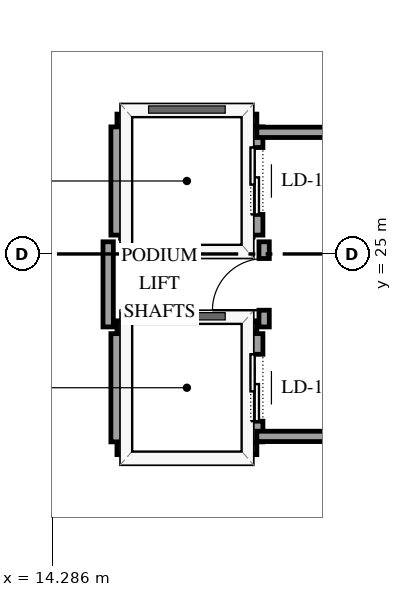
"""IFC4 building model, lengths in metres.
Left out: names, types, materials, properties, quantities, classifications, styles, units other than length and angle.
Written with IfcOpenShell. Run it as: python <this file> out.ifc"""

import sys

from ifc_helpers import new_model, si_unit, direction, frame, frame_2d, origin, place, context, subcontext, project, spatial, rectangle, extrude, element, fill, save


model = new_model("IFC4")
c1 = context("Model", 3, precision=1e-05, world=origin(), true_north=direction((0.0, 1.0)))
c2 = subcontext(c1, "Body", "Model", "MODEL_VIEW")
j1 = project(units=[si_unit("LENGTHUNIT", "METRE"), si_unit("PLANEANGLEUNIT", "RADIAN")], contexts=[c1])
p1 = place(None, origin())
s1 = spatial("IfcSite", under=j1, at=p1, CompositionType="ELEMENT")
p2 = place(p1, origin())
s2 = spatial("IfcBuilding", under=s1, at=p2, CompositionType="ELEMENT")
p3 = place(p2, origin())
s3 = spatial("IfcBuildingStorey", under=s2, at=p3, CompositionType="ELEMENT", Elevation=0.0)
for number, where, z_axis, x_axis in (
    (1, (15.35, 21.8, 0.0), (0.0, 0.0, 1.0), (1.0, 0.0, 0.0)),
    (2, (15.35, 23.8, 0.0), (0.0, 0.0, 1.0), (1.0, 0.0, 0.0)),
):
    element("IfcWall", number, at=place(p3, frame(where, z_axis=z_axis, x_axis=x_axis)), inside=s3, PredefinedType="SOLIDWALL", context=c2, shape_type="SweptSolid", body=[
        extrude(rectangle(XDim=2.3, YDim=0.2, at=frame_2d((1.15, 0.0))), origin(), (0.0, 0.0, 1.0), 5.68),
    ])
p4 = place(p3, frame((15.35, 21.91, 0.0), z_axis=(0.0, 0.0, 1.0), x_axis=(0.0, 1.0, 0.0)))
e3 = element("IfcWall", 3, at=p4, inside=s3, PredefinedType="SOLIDWALL", context=c2, shape_type="SweptSolid", body=[
    extrude(rectangle(XDim=1.78, YDim=0.2, at=frame_2d((0.89, 0.0))), origin(), (0.0, 0.0, 1.0), 5.68),
])
p5 = place(p3, frame((17.65, 21.91, 0.0), z_axis=(0.0, 0.0, 1.0), x_axis=(0.0, 1.0, 0.0)))
e4 = element("IfcWall", 4, at=p5, inside=s3, PredefinedType="SOLIDWALL", context=c2, shape_type="SweptSolid", body=[
    extrude(rectangle(XDim=1.78, YDim=0.2, at=frame_2d((0.89, 0.0))), origin(), (0.0, 0.0, 1.0), 5.68),
])
p6 = place(p5, frame((0.34, 0.0, 0.0)))
e5 = element("IfcOpeningElement", 5, at=p6, cuts=e4, PredefinedType="OPENING", context=c2, shape_type="SweptSolid", body=[
    extrude(rectangle(XDim=1.1, YDim=2.15, at=frame_2d((0.55, 1.075))), frame((0.0, 0.11, 0.0), z_axis=(0.0, -1.0, 0.0), x_axis=(1.0, 0.0, 0.0)), (0.0, 0.0, 1.0), 0.22),
])
p7 = place(p3, frame((15.35, 27.2, 0.0), z_axis=(0.0, 0.0, 1.0), x_axis=(1.0, 0.0, 0.0)))
e6 = element("IfcWall", 6, at=p7, inside=s3, PredefinedType="SOLIDWALL", context=c2, shape_type="SweptSolid", body=[
    extrude(rectangle(XDim=2.3, YDim=0.2, at=frame_2d((1.15, 0.0))), origin(), (0.0, 0.0, 1.0), 5.68),
])
p8 = place(p3, frame((15.35, 25.31, 0.0), z_axis=(0.0, 0.0, 1.0), x_axis=(0.0, 1.0, 0.0)))
e7 = element("IfcWall", 7, at=p8, inside=s3, PredefinedType="SOLIDWALL", context=c2, shape_type="SweptSolid", body=[
    extrude(rectangle(XDim=1.78, YDim=0.2, at=frame_2d((0.89, 0.0))), origin(), (0.0, 0.0, 1.0), 5.68),
])
p9 = place(p3, frame((17.65, 25.31, 0.0), z_axis=(0.0, 0.0, 1.0), x_axis=(0.0, 1.0, 0.0)))
e8 = element("IfcWall", 8, at=p9, inside=s3, PredefinedType="SOLIDWALL", context=c2, shape_type="SweptSolid", body=[
    extrude(rectangle(XDim=1.78, YDim=0.2, at=frame_2d((0.89, 0.0))), origin(), (0.0, 0.0, 1.0), 5.68),
])
p10 = place(p9, frame((0.34, 0.0, 0.0)))
e9 = element("IfcOpeningElement", 9, at=p10, cuts=e8, PredefinedType="OPENING", context=c2, shape_type="SweptSolid", body=[
    extrude(rectangle(XDim=1.1, YDim=2.15, at=frame_2d((0.55, 1.075))), frame((0.0, 0.11, 0.0), z_axis=(0.0, -1.0, 0.0), x_axis=(1.0, 0.0, 0.0)), (0.0, 0.0, 1.0), 0.22),
])
for number, where, z_axis, x_axis in (
    (10, (30.53, 22.0, 0.0), (0.0, 0.0, 1.0), (-1.0, 0.0, 0.0)),
    (11, (17.65, 27.0, 0.0), (0.0, 0.0, 1.0), (1.0, 0.0, 0.0)),
):
    element("IfcWall", number, at=place(p3, frame(where, z_axis=z_axis, x_axis=x_axis)), inside=s3, PredefinedType="PARTITIONING", context=c2, shape_type="SweptSolid", body=[
        extrude(rectangle(XDim=12.88, YDim=0.17, at=frame_2d((6.44, 0.0))), origin(), (0.0, 0.0, 1.0), 5.68),
    ])
p11 = place(p3, frame((17.77, 23.8, 0.0), z_axis=(0.0, 0.0, 1.0), x_axis=(0.0, 1.0, 0.0)))
e12 = element("IfcWall", 12, at=p11, inside=s3, PredefinedType="PARTITIONING", context=c2, shape_type="SweptSolid", body=[
    extrude(rectangle(XDim=1.4, YDim=0.17, at=frame_2d((0.7, 0.0))), origin(), (0.0, 0.0, 1.0), 5.68),
])
p12 = place(p11, frame((0.275, 0.0, 0.0)))
e13 = element("IfcOpeningElement", 13, at=p12, cuts=e12, PredefinedType="OPENING", context=c2, shape_type="SweptSolid", body=[
    extrude(rectangle(XDim=0.85, YDim=2.1, at=frame_2d((0.425, 1.05))), frame((0.0, 0.095, 0.0), z_axis=(0.0, -1.0, 0.0), x_axis=(1.0, 0.0, 0.0)), (0.0, 0.0, 1.0), 0.19),
])
p13 = place(p3, frame((15.205, 23.8, 0.0), z_axis=(0.0, 0.0, 1.0), x_axis=(0.0, 1.0, 0.0)))
e14 = element("IfcWall", 14, at=p13, inside=s3, PredefinedType="PARTITIONING", context=c2, shape_type="SweptSolid", body=[
    extrude(rectangle(XDim=1.4, YDim=0.17, at=frame_2d((0.7, 0.0))), origin(), (0.0, 0.0, 1.0), 5.68),
])
p14 = place(p6, origin())
e15 = element("IfcDoor", 15, at=p14, inside=s3, OperationType="SLIDING_TO_LEFT", PredefinedType="DOOR", context=c2, shape_type="SweptSolid", body=[
    extrude(rectangle(XDim=1.1, YDim=2.15, at=frame_2d((0.55, 1.075))), frame((0.0, 0.025, 0.0), z_axis=(0.0, -1.0, 0.0), x_axis=(1.0, 0.0, 0.0)), (0.0, 0.0, 1.0), 0.05),
])
fill(e5, e15)
p15 = place(p10, origin())
e16 = element("IfcDoor", 16, at=p15, inside=s3, OperationType="SLIDING_TO_LEFT", PredefinedType="DOOR", context=c2, shape_type="SweptSolid", body=[
    extrude(rectangle(XDim=1.1, YDim=2.15, at=frame_2d((0.55, 1.075))), frame((0.0, 0.025, 0.0), z_axis=(0.0, -1.0, 0.0), x_axis=(1.0, 0.0, 0.0)), (0.0, 0.0, 1.0), 0.05),
])
fill(e9, e16)
p16 = place(p12, origin())
e17 = element("IfcDoor", 17, at=p16, inside=s3, OperationType="SINGLE_SWING_LEFT", PredefinedType="DOOR", context=c2, shape_type="SweptSolid", body=[
    extrude(rectangle(XDim=0.85, YDim=2.1, at=frame_2d((0.425, 1.05))), frame((0.0, 0.025, 0.0), z_axis=(0.0, -1.0, 0.0), x_axis=(1.0, 0.0, 0.0)), (0.0, 0.0, 1.0), 0.05),
])
fill(e13, e17)
save(model, sys.argv[1])
